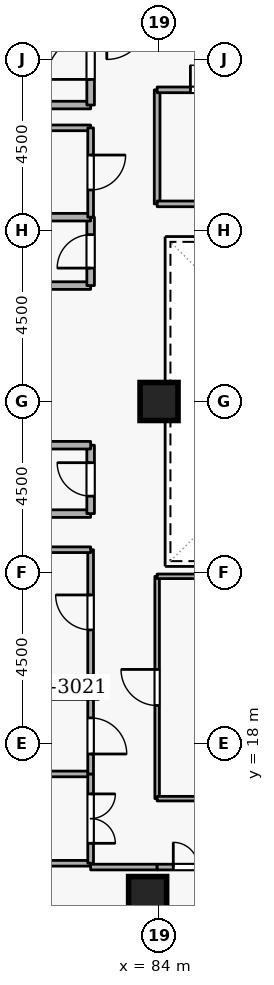
"""IFC4 building model, lengths in metres.
Left out: names, types, materials, properties, quantities, classifications, styles, units other than length and angle.
Written with IfcOpenShell. Run it as: python <this file> out.ifc"""

import sys

from ifc_helpers import new_model, si_unit, direction, frame, frame_2d, origin, origin_2d, place, context, subcontext, project, spatial, rectangle, extrude, element, fill, save


model = new_model("IFC4")
c1 = context("Model", 3, precision=1e-05, world=origin(), true_north=direction((0.0, 1.0)))
c2 = subcontext(c1, "Body", "Model", "MODEL_VIEW")
j1 = project(units=[si_unit("LENGTHUNIT", "METRE"), si_unit("PLANEANGLEUNIT", "RADIAN")], contexts=[c1])
p1 = place(None, origin())
s1 = spatial("IfcSite", under=j1, at=p1, CompositionType="ELEMENT")
p2 = place(p1, origin())
s2 = spatial("IfcBuilding", under=s1, at=p2, CompositionType="ELEMENT")
p3 = place(p2, frame((0.0, 0.0, 247.5)))
s3 = spatial("IfcBuildingStorey", under=s2, at=p3, CompositionType="ELEMENT", Elevation=247.5)
p4 = place(p3, frame((76.6, 19.45, 0.0), z_axis=(0.0, 0.0, 1.0), x_axis=(1.0, 0.0, 0.0)))
e1 = element("IfcWall", 1, at=p4, inside=s3, PredefinedType="SHEAR", context=c2, shape_type="SweptSolid", body=[
    extrude(rectangle(XDim=5.8, YDim=0.5, at=frame_2d((2.9, 0.0))), origin(), (0.0, 0.0, 1.0), 3.6),
])
for number, where, z_axis, x_axis in (
    (2, (83.7, 14.0, 0.0), (0.0, 0.0, 1.0), (1.0, 0.0, 0.0)),
    (3, (84.0, 27.0, 0.0), (0.0, 0.0, 1.0), (1.0, 0.0, 0.0)),
):
    element("IfcColumn", number, at=place(p3, frame(where, z_axis=z_axis, x_axis=x_axis)), inside=s3, PredefinedType="COLUMN", context=c2, shape_type="SweptSolid", body=[
        extrude(rectangle(XDim=1.0, YDim=1.0, at=origin_2d()), origin(), (0.0, 0.0, 1.0), 3.6),
    ])
p5 = place(p3, frame((79.9, 34.8, 0.0), z_axis=(0.0, 0.0, 1.0), x_axis=(1.0, 0.0, 0.0)))
e4 = element("IfcWall", 4, at=p5, inside=s3, PredefinedType="STANDARD", context=c2, shape_type="SweptSolid", body=[
    extrude(rectangle(XDim=2.3, YDim=0.2, at=frame_2d((1.15, 0.0))), origin(), (0.0, 0.0, 1.0), 2.545),
])
p6 = place(p3, frame((82.2, 34.8, 0.0), z_axis=(0.0, 0.0, 1.0), x_axis=(0.0, 1.0, 0.0)))
e5 = element("IfcWall", 5, at=p6, inside=s3, PredefinedType="STANDARD", context=c2, shape_type="SweptSolid", body=[
    extrude(rectangle(XDim=2.5, YDim=0.2, at=frame_2d((1.25, 0.0))), origin(), (0.0, 0.0, 1.0), 3.34),
])
p7 = place(p6, frame((0.675, 0.0, 0.0)))
e6 = element("IfcOpeningElement", 6, at=p7, cuts=e5, PredefinedType="OPENING", context=c2, shape_type="SweptSolid", body=[
    extrude(rectangle(XDim=1.15, YDim=2.1, at=frame_2d((0.575, 1.05))), frame((0.0, 0.11, 0.0), z_axis=(0.0, -1.0, 0.0), x_axis=(1.0, 0.0, 0.0)), (0.0, 0.0, 1.0), 0.22),
])
p8 = place(p3, frame((80.15, 24.05, 0.0), z_axis=(0.0, 0.0, 1.0), x_axis=(1.0, 0.0, 0.0)))
e7 = element("IfcWall", 7, at=p8, inside=s3, PredefinedType="STANDARD", context=c2, shape_type="SweptSolid", body=[
    extrude(rectangle(XDim=2.05, YDim=0.2, at=frame_2d((1.025, 0.0))), origin(), (0.0, 0.0, 1.0), 3.34),
])
p9 = place(p3, frame((82.2, 24.05, 0.0), z_axis=(0.0, 0.0, 1.0), x_axis=(0.0, 1.0, 0.0)))
e8 = element("IfcWall", 8, at=p9, inside=s3, PredefinedType="STANDARD", context=c2, shape_type="SweptSolid", body=[
    extrude(rectangle(XDim=1.8, YDim=0.2, at=frame_2d((0.9, 0.0))), origin(), (0.0, 0.0, 1.0), 3.34),
])
p10 = place(p9, frame((0.46, 0.0, 0.0)))
e9 = element("IfcOpeningElement", 9, at=p10, cuts=e8, PredefinedType="OPENING", context=c2, shape_type="SweptSolid", body=[
    extrude(rectangle(XDim=0.88, YDim=2.04, at=frame_2d((0.44, 1.02))), frame((0.0, 0.11, 0.0), z_axis=(0.0, -1.0, 0.0), x_axis=(1.0, 0.0, 0.0)), (0.0, 0.0, 1.0), 0.22),
])
for number, where, z_axis, x_axis in (
    (10, (82.2, 25.85, 0.0), (0.0, 0.0, 1.0), (-1.0, 0.0, 0.0)),
    (11, (80.15, 30.05, 0.0), (0.0, 0.0, 1.0), (1.0, 0.0, 0.0)),
):
    element("IfcWall", number, at=place(p3, frame(where, z_axis=z_axis, x_axis=x_axis)), inside=s3, PredefinedType="STANDARD", context=c2, shape_type="SweptSolid", body=[
        extrude(rectangle(XDim=2.05, YDim=0.2, at=frame_2d((1.025, 0.0))), origin(), (0.0, 0.0, 1.0), 3.34),
    ])
p11 = place(p3, frame((82.2, 30.05, 0.0), z_axis=(0.0, 0.0, 1.0), x_axis=(0.0, 1.0, 0.0)))
e12 = element("IfcWall", 12, at=p11, inside=s3, PredefinedType="STANDARD", context=c2, shape_type="SweptSolid", body=[
    extrude(rectangle(XDim=1.8, YDim=0.2, at=frame_2d((0.9, 0.0))), origin(), (0.0, 0.0, 1.0), 3.34),
])
p12 = place(p11, frame((0.46, 0.0, 0.0)))
e13 = element("IfcOpeningElement", 13, at=p12, cuts=e12, PredefinedType="OPENING", context=c2, shape_type="SweptSolid", body=[
    extrude(rectangle(XDim=0.88, YDim=2.04, at=frame_2d((0.44, 1.02))), frame((0.0, 0.11, 0.0), z_axis=(0.0, -1.0, 0.0), x_axis=(1.0, 0.0, 0.0)), (0.0, 0.0, 1.0), 0.22),
])
p13 = place(p3, frame((82.2, 31.85, 0.0), z_axis=(0.0, 0.0, 1.0), x_axis=(-1.0, 0.0, 0.0)))
e14 = element("IfcWall", 14, at=p13, inside=s3, PredefinedType="STANDARD", context=c2, shape_type="SweptSolid", body=[
    extrude(rectangle(XDim=2.05, YDim=0.2, at=frame_2d((1.025, 0.0))), origin(), (0.0, 0.0, 1.0), 3.34),
])
p14 = place(p3, frame((82.2, 19.8, 0.0), z_axis=(0.0, 0.0, 1.0), x_axis=(0.0, 1.0, 0.0)))
e15 = element("IfcWall", 15, at=p14, inside=s3, PredefinedType="PARTITIONING", context=c2, shape_type="SweptSolid", body=[
    extrude(rectangle(XDim=3.3, YDim=0.15, at=frame_2d((1.65, 0.0))), origin(), (0.0, 0.0, 1.0), 3.34),
])
p15 = place(p14, frame((1.19, 0.0, 0.0)))
e16 = element("IfcOpeningElement", 16, at=p15, cuts=e15, PredefinedType="OPENING", context=c2, shape_type="SweptSolid", body=[
    extrude(rectangle(XDim=0.92, YDim=2.08, at=frame_2d((0.46, 1.04))), frame((0.0, 0.085, 0.0), z_axis=(0.0, -1.0, 0.0), x_axis=(1.0, 0.0, 0.0)), (0.0, 0.0, 1.0), 0.17),
])
p16 = place(p3, frame((82.2, 23.1, 0.0), z_axis=(0.0, 0.0, 1.0), x_axis=(-1.0, 0.0, 0.0)))
e17 = element("IfcWall", 17, at=p16, inside=s3, PredefinedType="PARTITIONING", context=c2, shape_type="SweptSolid", body=[
    extrude(rectangle(XDim=2.05, YDim=0.15, at=frame_2d((1.025, 0.0))), origin(), (0.0, 0.0, 1.0), 3.34),
])
p17 = place(p3, frame((80.15, 34.2, 0.0), z_axis=(0.0, 0.0, 1.0), x_axis=(1.0, 0.0, 0.0)))
e18 = element("IfcWall", 18, at=p17, inside=s3, PredefinedType="PARTITIONING", context=c2, shape_type="SweptSolid", body=[
    extrude(rectangle(XDim=2.05, YDim=0.15, at=frame_2d((1.025, 0.0))), origin(), (0.0, 0.0, 1.0), 2.545),
])
p18 = place(p3, frame((82.2, 34.2, 0.0), z_axis=(0.0, 0.0, 1.0), x_axis=(0.0, -1.0, 0.0)))
e19 = element("IfcWall", 19, at=p18, inside=s3, PredefinedType="PARTITIONING", context=c2, shape_type="SweptSolid", body=[
    extrude(rectangle(XDim=2.35, YDim=0.15, at=frame_2d((1.175, 0.0))), origin(), (0.0, 0.0, 1.0), 3.34),
])
p19 = place(p18, frame((0.715, 0.0, 0.0)))
e20 = element("IfcOpeningElement", 20, at=p19, cuts=e19, PredefinedType="OPENING", context=c2, shape_type="SweptSolid", body=[
    extrude(rectangle(XDim=0.92, YDim=2.08, at=frame_2d((0.46, 1.04))), frame((0.0, 0.085, 0.0), z_axis=(0.0, -1.0, 0.0), x_axis=(1.0, 0.0, 0.0)), (0.0, 0.0, 1.0), 0.17),
])
for number, where, z_axis, x_axis in (
    (21, (82.2, 14.85, 0.0), (0.0, 0.0, 1.0), (-1.0, 0.0, 0.0)),
    (22, (70.78, 17.2, 0.0), (0.0, 0.0, 1.0), (1.0, 0.0, 0.0)),
):
    element("IfcWall", number, at=place(p3, frame(where, z_axis=z_axis, x_axis=x_axis)), inside=s3, PredefinedType="PARTITIONING", context=c2, shape_type="SweptSolid", body=[
        extrude(rectangle(XDim=11.42, YDim=0.15, at=frame_2d((5.71, 0.0))), origin(), (0.0, 0.0, 1.0), 3.34),
    ])
p20 = place(p3, frame((82.2, 17.2, 0.0), z_axis=(0.0, 0.0, 1.0), x_axis=(0.0, -1.0, 0.0)))
e23 = element("IfcWall", 23, at=p20, inside=s3, PredefinedType="PARTITIONING", context=c2, shape_type="SweptSolid", body=[
    extrude(rectangle(XDim=2.35, YDim=0.15, at=frame_2d((1.175, 0.0))), origin(), (0.0, 0.0, 1.0), 3.34),
])
p21 = place(p20, frame((0.525, 0.0, 0.0)))
e24 = element("IfcOpeningElement", 24, at=p21, cuts=e23, PredefinedType="OPENING", context=c2, shape_type="SweptSolid", body=[
    extrude(rectangle(XDim=1.3, YDim=2.12, at=frame_2d((0.65, 1.06))), frame((0.0, 0.085, 0.0), z_axis=(0.0, -1.0, 0.0), x_axis=(1.0, 0.0, 0.0)), (0.0, 0.0, 1.0), 0.17),
])
p22 = place(p3, frame((82.2, 19.2, 0.0), z_axis=(0.0, 0.0, 1.0), x_axis=(0.0, -1.0, 0.0)))
e25 = element("IfcWall", 25, at=p22, inside=s3, PredefinedType="PARTITIONING", context=c2, shape_type="SweptSolid", body=[
    extrude(rectangle(XDim=2.0, YDim=0.15, at=frame_2d((1.0, 0.0))), origin(), (0.0, 0.0, 1.0), 3.34),
])
p23 = place(p22, frame((0.525, 0.0, 0.0)))
e26 = element("IfcOpeningElement", 26, at=p23, cuts=e25, PredefinedType="OPENING", context=c2, shape_type="SweptSolid", body=[
    extrude(rectangle(XDim=0.95, YDim=2.1, at=frame_2d((0.475, 1.05))), frame((0.0, 0.085, 0.0), z_axis=(0.0, -1.0, 0.0), x_axis=(1.0, 0.0, 0.0)), (0.0, 0.0, 1.0), 0.17),
])
p24 = place(p3, frame((82.2, 14.75, 0.0), z_axis=(0.0, 0.0, 1.0), x_axis=(1.0, 0.0, 0.0)))
e27 = element("IfcWall", 27, at=p24, inside=s3, PredefinedType="PARTITIONING", context=c2, shape_type="SweptSolid", body=[
    extrude(rectangle(XDim=1.75, YDim=0.15, at=frame_2d((0.875, 0.0))), origin(), (0.0, 0.0, 1.0), 3.34),
])
p25 = place(p3, frame((83.95, 14.75, 0.0), z_axis=(0.0, 0.0, 1.0), x_axis=(1.0, 0.0, 0.0)))
e28 = element("IfcWall", 28, at=p25, inside=s3, PredefinedType="PARTITIONING", context=c2, shape_type="SweptSolid", body=[
    extrude(rectangle(XDim=2.15, YDim=0.15, at=frame_2d((1.075, 0.0))), origin(), (0.0, 0.0, 1.0), 3.34),
])
p26 = place(p25, frame((0.425, 0.0, 0.0)))
e29 = element("IfcOpeningElement", 29, at=p26, cuts=e28, PredefinedType="OPENING", context=c2, shape_type="SweptSolid", body=[
    extrude(rectangle(XDim=1.3, YDim=2.12, at=frame_2d((0.65, 1.06))), frame((0.0, 0.085, 0.0), z_axis=(0.0, -1.0, 0.0), x_axis=(1.0, 0.0, 0.0)), (0.0, 0.0, 1.0), 0.17),
])
p27 = place(p3, frame((83.95, 16.55, 0.0), z_axis=(0.0, 0.0, 1.0), x_axis=(0.0, 1.0, 0.0)))
e30 = element("IfcWall", 30, at=p27, inside=s3, PredefinedType="PARTITIONING", context=c2, shape_type="SweptSolid", body=[
    extrude(rectangle(XDim=5.85, YDim=0.12, at=frame_2d((2.925, 0.0))), origin(), (0.0, 0.0, 1.0), 3.34),
])
p28 = place(p27, frame((2.45, 0.0, 0.0)))
e31 = element("IfcOpeningElement", 31, at=p28, cuts=e30, PredefinedType="OPENING", context=c2, shape_type="SweptSolid", body=[
    extrude(rectangle(XDim=0.95, YDim=2.1, at=frame_2d((0.475, 1.05))), frame((0.0, 0.07, 0.0), z_axis=(0.0, -1.0, 0.0), x_axis=(1.0, 0.0, 0.0)), (0.0, 0.0, 1.0), 0.14),
])
for number, where, z_axis, x_axis in (
    (32, (83.95, 22.4, 0.0), (0.0, 0.0, 1.0), (1.0, 0.0, 0.0)),
    (33, (89.3, 16.55, 0.0), (0.0, 0.0, 1.0), (-1.0, 0.0, 0.0)),
):
    element("IfcWall", number, at=place(p3, frame(where, z_axis=z_axis, x_axis=x_axis)), inside=s3, PredefinedType="PARTITIONING", context=c2, shape_type="SweptSolid", body=[
        extrude(rectangle(XDim=5.35, YDim=0.12, at=frame_2d((2.675, 0.0))), origin(), (0.0, 0.0, 1.0), 3.34),
    ])
p29 = place(p3, frame((83.95, 32.2, 0.0), z_axis=(0.0, 0.0, 1.0), x_axis=(0.0, 1.0, 0.0)))
e34 = element("IfcWall", 34, at=p29, inside=s3, PredefinedType="PARTITIONING", context=c2, shape_type="SweptSolid", body=[
    extrude(rectangle(XDim=3.0, YDim=0.15, at=frame_2d((1.5, 0.0))), origin(), (0.0, 0.0, 1.0), 3.34),
])
p30 = place(p3, frame((83.95, 35.2, 0.0), z_axis=(0.0, 0.0, 1.0), x_axis=(1.0, 0.0, 0.0)))
e35 = element("IfcWall", 35, at=p30, inside=s3, PredefinedType="PARTITIONING", context=c2, shape_type="SweptSolid", body=[
    extrude(rectangle(XDim=3.05, YDim=0.15, at=frame_2d((1.525, 0.0))), origin(), (0.0, 0.0, 1.0), 3.34),
])
p31 = place(p30, frame((0.875, 0.0, 0.0)))
e36 = element("IfcOpeningElement", 36, at=p31, cuts=e35, PredefinedType="OPENING", context=c2, shape_type="SweptSolid", body=[
    extrude(rectangle(XDim=1.3, YDim=2.12, at=frame_2d((0.65, 1.06))), frame((0.0, 0.085, 0.0), z_axis=(0.0, -1.0, 0.0), x_axis=(1.0, 0.0, 0.0)), (0.0, 0.0, 1.0), 0.17),
])
p32 = place(p3, frame((87.0, 32.2, 0.0), z_axis=(0.0, 0.0, 1.0), x_axis=(-1.0, 0.0, 0.0)))
e37 = element("IfcWall", 37, at=p32, inside=s3, PredefinedType="PARTITIONING", context=c2, shape_type="SweptSolid", body=[
    extrude(rectangle(XDim=3.05, YDim=0.15, at=frame_2d((1.525, 0.0))), origin(), (0.0, 0.0, 1.0), 3.34),
])
p33 = place(p7, origin())
e38 = element("IfcDoor", 38, at=p33, inside=s3, OperationType="SINGLE_SWING_LEFT", PredefinedType="DOOR", context=c2, shape_type="SweptSolid", body=[
    extrude(rectangle(XDim=1.15, YDim=2.1, at=frame_2d((0.575, 1.05))), frame((0.0, 0.025, 0.0), z_axis=(0.0, -1.0, 0.0), x_axis=(1.0, 0.0, 0.0)), (0.0, 0.0, 1.0), 0.05),
])
fill(e6, e38)
p34 = place(p10, origin())
e39 = element("IfcDoor", 39, at=p34, inside=s3, OperationType="SINGLE_SWING_RIGHT", PredefinedType="DOOR", context=c2, shape_type="SweptSolid", body=[
    extrude(rectangle(XDim=0.88, YDim=2.04, at=frame_2d((0.44, 1.02))), frame((0.0, 0.025, 0.0), z_axis=(0.0, -1.0, 0.0), x_axis=(1.0, 0.0, 0.0)), (0.0, 0.0, 1.0), 0.05),
])
fill(e9, e39)
p35 = place(p12, origin())
e40 = element("IfcDoor", 40, at=p35, inside=s3, OperationType="SINGLE_SWING_LEFT", PredefinedType="DOOR", context=c2, shape_type="SweptSolid", body=[
    extrude(rectangle(XDim=0.88, YDim=2.04, at=frame_2d((0.44, 1.02))), frame((0.0, 0.025, 0.0), z_axis=(0.0, -1.0, 0.0), x_axis=(1.0, 0.0, 0.0)), (0.0, 0.0, 1.0), 0.05),
])
fill(e13, e40)
p36 = place(p15, origin())
e41 = element("IfcDoor", 41, at=p36, inside=s3, OperationType="SINGLE_SWING_RIGHT", PredefinedType="DOOR", context=c2, shape_type="SweptSolid", body=[
    extrude(rectangle(XDim=0.92, YDim=2.08, at=frame_2d((0.46, 1.04))), frame((0.0, 0.025, 0.0), z_axis=(0.0, -1.0, 0.0), x_axis=(1.0, 0.0, 0.0)), (0.0, 0.0, 1.0), 0.05),
])
fill(e16, e41)
p37 = place(p19, origin())
e42 = element("IfcDoor", 42, at=p37, inside=s3, OperationType="SINGLE_SWING_LEFT", PredefinedType="DOOR", context=c2, shape_type="SweptSolid", body=[
    extrude(rectangle(XDim=0.92, YDim=2.08, at=frame_2d((0.46, 1.04))), frame((0.0, 0.025, 0.0), z_axis=(0.0, -1.0, 0.0), x_axis=(1.0, 0.0, 0.0)), (0.0, 0.0, 1.0), 0.05),
])
fill(e20, e42)
p38 = place(p21, origin())
e43 = element("IfcDoor", 43, at=p38, inside=s3, OperationType="DOUBLE_DOOR_SINGLE_SWING", PredefinedType="DOOR", context=c2, shape_type="SweptSolid", body=[
    extrude(rectangle(XDim=1.3, YDim=2.12, at=frame_2d((0.65, 1.06))), frame((0.0, 0.025, 0.0), z_axis=(0.0, -1.0, 0.0), x_axis=(1.0, 0.0, 0.0)), (0.0, 0.0, 1.0), 0.05),
])
fill(e24, e43)
p39 = place(p23, origin())
e44 = element("IfcDoor", 44, at=p39, inside=s3, OperationType="SINGLE_SWING_RIGHT", PredefinedType="DOOR", context=c2, shape_type="SweptSolid", body=[
    extrude(rectangle(XDim=0.95, YDim=2.1, at=frame_2d((0.475, 1.05))), frame((0.0, 0.025, 0.0), z_axis=(0.0, -1.0, 0.0), x_axis=(1.0, 0.0, 0.0)), (0.0, 0.0, 1.0), 0.05),
])
fill(e26, e44)
p40 = place(p26, origin())
e45 = element("IfcDoor", 45, at=p40, inside=s3, OperationType="DOUBLE_DOOR_SINGLE_SWING", PredefinedType="DOOR", context=c2, shape_type="SweptSolid", body=[
    extrude(rectangle(XDim=1.3, YDim=2.12, at=frame_2d((0.65, 1.06))), frame((0.0, 0.025, 0.0), z_axis=(0.0, -1.0, 0.0), x_axis=(1.0, 0.0, 0.0)), (0.0, 0.0, 1.0), 0.05),
])
fill(e29, e45)
p41 = place(p28, origin())
e46 = element("IfcDoor", 46, at=p41, inside=s3, OperationType="SINGLE_SWING_RIGHT", PredefinedType="DOOR", context=c2, shape_type="SweptSolid", body=[
    extrude(rectangle(XDim=0.95, YDim=2.1, at=frame_2d((0.475, 1.05))), frame((0.0, 0.025, 0.0), z_axis=(0.0, -1.0, 0.0), x_axis=(1.0, 0.0, 0.0)), (0.0, 0.0, 1.0), 0.05),
])
fill(e31, e46)
p42 = place(p31, origin())
e47 = element("IfcDoor", 47, at=p42, inside=s3, OperationType="DOUBLE_DOOR_SINGLE_SWING", PredefinedType="DOOR", context=c2, shape_type="SweptSolid", body=[
    extrude(rectangle(XDim=1.3, YDim=2.12, at=frame_2d((0.65, 1.06))), frame((0.0, 0.025, 0.0), z_axis=(0.0, -1.0, 0.0), x_axis=(1.0, 0.0, 0.0)), (0.0, 0.0, 1.0), 0.05),
])
fill(e36, e47)
save(model, sys.argv[1])
